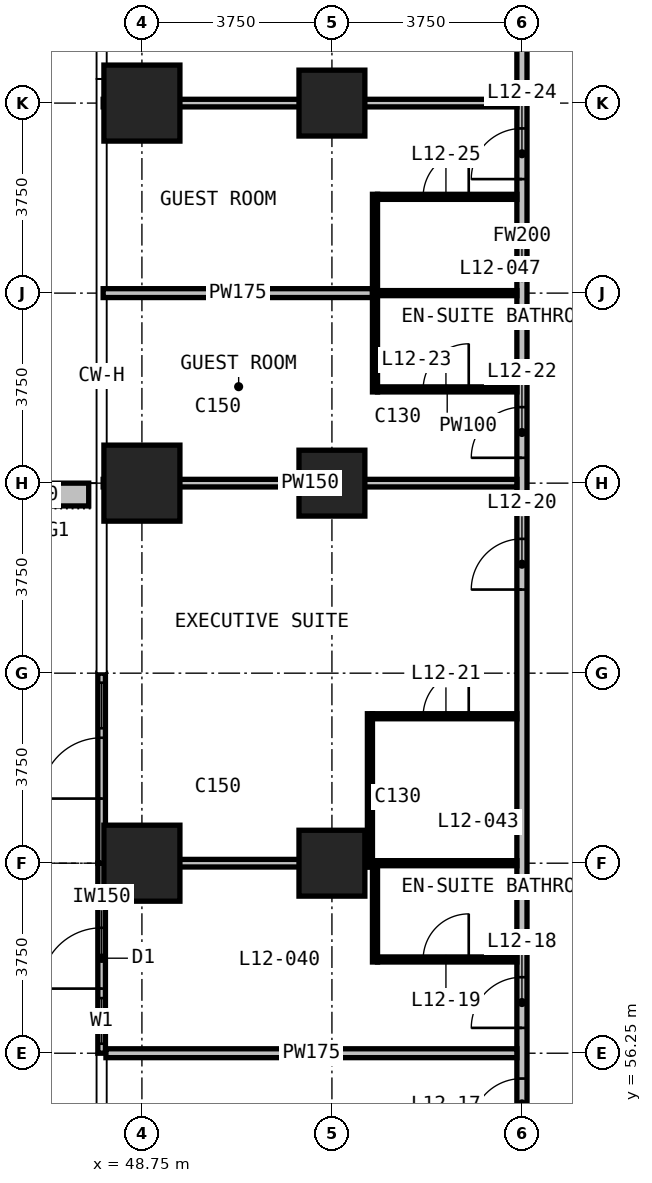
"""IFC4 building model, lengths in metres.
Left out: names, types, materials, properties, quantities, classifications, styles, units other than length and angle.
Written with IfcOpenShell. Run it as: python <this file> out.ifc"""

import sys

from ifc_helpers import new_model, si_unit, direction, frame, frame_2d, origin, origin_2d, place, context, subcontext, project, spatial, rectangle, extrude, element, fill, save


model = new_model("IFC4")
c1 = context("Model", 3, precision=1e-05, world=origin(), true_north=direction((0.0, 1.0)))
c2 = subcontext(c1, "Body", "Model", "MODEL_VIEW")
j1 = project(units=[si_unit("LENGTHUNIT", "METRE"), si_unit("PLANEANGLEUNIT", "RADIAN")], contexts=[c1])
p1 = place(None, origin())
s1 = spatial("IfcSite", under=j1, at=p1, CompositionType="ELEMENT")
p2 = place(p1, origin())
s2 = spatial("IfcBuilding", under=s1, at=p2, CompositionType="ELEMENT")
p3 = place(p2, frame((0.0, 0.0, 59.3)))
s3 = spatial("IfcBuildingStorey", under=s2, at=p3, CompositionType="ELEMENT", Elevation=59.3)
for number, where, z_axis, x_axis in (
    (1, (48.75, 60.0, 0.0), (0.0, 0.0, 1.0), (1.0, 0.0, 0.0)),
    (2, (48.75, 67.5, 0.0), (0.0, 0.0, 1.0), (1.0, 0.0, 0.0)),
    (3, (48.75, 75.0, 0.0), (0.0, 0.0, 1.0), (1.0, 0.0, 0.0)),
):
    element("IfcColumn", number, at=place(p3, frame(where, z_axis=z_axis, x_axis=x_axis)), inside=s3, PredefinedType="COLUMN", context=c2, shape_type="SweptSolid", body=[
        extrude(rectangle(XDim=1.5, YDim=1.5, at=origin_2d()), origin(), (0.0, 0.0, 1.0), 3.3),
    ])
for number, where, z_axis, x_axis in (
    (4, (52.5, 60.0, 0.0), (0.0, 0.0, 1.0), (1.0, 0.0, 0.0)),
    (5, (52.5, 67.5, 0.0), (0.0, 0.0, 1.0), (1.0, 0.0, 0.0)),
    (6, (52.5, 75.0, 0.0), (0.0, 0.0, 1.0), (1.0, 0.0, 0.0)),
):
    element("IfcColumn", number, at=place(p3, frame(where, z_axis=z_axis, x_axis=x_axis)), inside=s3, PredefinedType="COLUMN", context=c2, shape_type="SweptSolid", body=[
        extrude(rectangle(XDim=1.3, YDim=1.3, at=origin_2d()), origin(), (0.0, 0.0, 1.0), 3.3),
    ])
p4 = place(p3, frame((47.955, 56.25, 0.0), z_axis=(0.0, 0.0, 1.0), x_axis=(0.0, 1.0, 0.0)))
e7 = element("IfcWall", 7, at=p4, inside=s3, PredefinedType="SOLIDWALL", context=c2, shape_type="SweptSolid", body=[
    extrude(rectangle(XDim=3.75, YDim=0.15, at=frame_2d((1.875, 0.0))), origin(), (0.0, 0.0, 1.0), 3.0),
])
p5 = place(p4, frame((0.188, 0.0, 0.1)))
e8 = element("IfcOpeningElement", 8, at=p5, cuts=e7, PredefinedType="OPENING", context=c2, shape_type="SweptSolid", body=[
    extrude(rectangle(XDim=0.9, YDim=2.4, at=frame_2d((0.45, 1.2))), frame((0.0, 0.085, 0.0), z_axis=(0.0, -1.0, 0.0), x_axis=(1.0, 0.0, 0.0)), (0.0, 0.0, 1.0), 0.17),
])
p6 = place(p4, frame((1.275, 0.0, 0.0)))
e9 = element("IfcOpeningElement", 9, at=p6, cuts=e7, PredefinedType="OPENING", context=c2, shape_type="SweptSolid", body=[
    extrude(rectangle(XDim=1.2, YDim=2.4, at=frame_2d((0.6, 1.2))), frame((0.0, 0.085, 0.0), z_axis=(0.0, -1.0, 0.0), x_axis=(1.0, 0.0, 0.0)), (0.0, 0.0, 1.0), 0.17),
])
p7 = place(p3, frame((47.955, 60.0, 0.0), z_axis=(0.0, 0.0, 1.0), x_axis=(0.0, 1.0, 0.0)))
e10 = element("IfcWall", 10, at=p7, inside=s3, PredefinedType="SOLIDWALL", context=c2, shape_type="SweptSolid", body=[
    extrude(rectangle(XDim=3.75, YDim=0.15, at=frame_2d((1.875, 0.0))), origin(), (0.0, 0.0, 1.0), 3.0),
])
p8 = place(p7, frame((1.275, 0.0, 0.0)))
e11 = element("IfcOpeningElement", 11, at=p8, cuts=e10, PredefinedType="OPENING", context=c2, shape_type="SweptSolid", body=[
    extrude(rectangle(XDim=1.2, YDim=2.4, at=frame_2d((0.6, 1.2))), frame((0.0, 0.085, 0.0), z_axis=(0.0, -1.0, 0.0), x_axis=(1.0, 0.0, 0.0)), (0.0, 0.0, 1.0), 0.17),
])
p9 = place(p7, frame((2.663, 0.0, 0.1)))
e12 = element("IfcOpeningElement", 12, at=p9, cuts=e10, PredefinedType="OPENING", context=c2, shape_type="SweptSolid", body=[
    extrude(rectangle(XDim=0.9, YDim=2.4, at=frame_2d((0.45, 1.2))), frame((0.0, 0.085, 0.0), z_axis=(0.0, -1.0, 0.0), x_axis=(1.0, 0.0, 0.0)), (0.0, 0.0, 1.0), 0.17),
])
p10 = place(p3, frame((47.7, 67.275, 0.0), z_axis=(0.0, 0.0, 1.0), x_axis=(-1.0, 0.0, 0.0)))
e13 = element("IfcWall", 13, at=p10, inside=s3, PredefinedType="USERDEFINED", context=c2, shape_type="SweptSolid", body=[
    extrude(rectangle(XDim=2.35, YDim=0.45, at=frame_2d((1.175, 0.0))), origin(), (0.0, 0.0, 1.0), 1.1),
])
p11 = place(p3, frame((56.25, 52.4, 0.0), z_axis=(0.0, 0.0, 1.0), x_axis=(0.0, 1.0, 0.0)))
e14 = element("IfcWall", 14, at=p11, inside=s3, PredefinedType="PARTITIONING", context=c2, shape_type="SweptSolid", body=[
    extrude(rectangle(XDim=38.31, YDim=0.2, at=frame_2d((19.155, 0.0))), origin(), (0.0, 0.0, 1.0), 3.0),
])
p12 = place(p11, frame((2.35, 0.0, 0.0)))
e15 = element("IfcOpeningElement", 15, at=p12, cuts=e14, PredefinedType="OPENING", context=c2, shape_type="SweptSolid", body=[
    extrude(rectangle(XDim=1.0, YDim=2.2, at=frame_2d((0.5, 1.1))), frame((0.0, 0.11, 0.0), z_axis=(0.0, -1.0, 0.0), x_axis=(1.0, 0.0, 0.0)), (0.0, 0.0, 1.0), 0.22),
])
p13 = place(p11, frame((4.35, 0.0, 0.0)))
e16 = element("IfcOpeningElement", 16, at=p13, cuts=e14, PredefinedType="OPENING", context=c2, shape_type="SweptSolid", body=[
    extrude(rectangle(XDim=1.0, YDim=2.2, at=frame_2d((0.5, 1.1))), frame((0.0, 0.11, 0.0), z_axis=(0.0, -1.0, 0.0), x_axis=(1.0, 0.0, 0.0)), (0.0, 0.0, 1.0), 0.22),
])
p14 = place(p11, frame((13.0, 0.0, 0.0)))
e17 = element("IfcOpeningElement", 17, at=p14, cuts=e14, PredefinedType="OPENING", context=c2, shape_type="SweptSolid", body=[
    extrude(rectangle(XDim=1.0, YDim=2.2, at=frame_2d((0.5, 1.1))), frame((0.0, 0.11, 0.0), z_axis=(0.0, -1.0, 0.0), x_axis=(1.0, 0.0, 0.0)), (0.0, 0.0, 1.0), 0.22),
])
p15 = place(p11, frame((15.6, 0.0, 0.0)))
e18 = element("IfcOpeningElement", 18, at=p15, cuts=e14, PredefinedType="OPENING", context=c2, shape_type="SweptSolid", body=[
    extrude(rectangle(XDim=1.0, YDim=2.2, at=frame_2d((0.5, 1.1))), frame((0.0, 0.11, 0.0), z_axis=(0.0, -1.0, 0.0), x_axis=(1.0, 0.0, 0.0)), (0.0, 0.0, 1.0), 0.22),
])
p16 = place(p11, frame((21.1, 0.0, 0.0)))
e19 = element("IfcOpeningElement", 19, at=p16, cuts=e14, PredefinedType="OPENING", context=c2, shape_type="SweptSolid", body=[
    extrude(rectangle(XDim=1.0, YDim=2.2, at=frame_2d((0.5, 1.1))), frame((0.0, 0.11, 0.0), z_axis=(0.0, -1.0, 0.0), x_axis=(1.0, 0.0, 0.0)), (0.0, 0.0, 1.0), 0.22),
])
p17 = place(p11, frame((23.7, 0.0, 0.0)))
e20 = element("IfcOpeningElement", 20, at=p17, cuts=e14, PredefinedType="OPENING", context=c2, shape_type="SweptSolid", body=[
    extrude(rectangle(XDim=1.0, YDim=2.2, at=frame_2d((0.5, 1.1))), frame((0.0, 0.11, 0.0), z_axis=(0.0, -1.0, 0.0), x_axis=(1.0, 0.0, 0.0)), (0.0, 0.0, 1.0), 0.22),
])
p18 = place(p11, frame((31.55, 0.0, 0.0)))
e21 = element("IfcOpeningElement", 21, at=p18, cuts=e14, PredefinedType="OPENING", context=c2, shape_type="SweptSolid", body=[
    extrude(rectangle(XDim=0.9, YDim=2.2, at=frame_2d((0.45, 1.1))), frame((0.0, 0.11, 0.0), z_axis=(0.0, -1.0, 0.0), x_axis=(1.0, 0.0, 0.0)), (0.0, 0.0, 1.0), 0.22),
])
p19 = place(p11, frame((35.65, 0.0, 0.0)))
e22 = element("IfcOpeningElement", 22, at=p19, cuts=e14, PredefinedType="OPENING", context=c2, shape_type="SweptSolid", body=[
    extrude(rectangle(XDim=0.9, YDim=2.2, at=frame_2d((0.45, 1.1))), frame((0.0, 0.11, 0.0), z_axis=(0.0, -1.0, 0.0), x_axis=(1.0, 0.0, 0.0)), (0.0, 0.0, 1.0), 0.22),
])
p20 = place(p3, frame((48.04, 56.25, 0.0), z_axis=(0.0, 0.0, 1.0), x_axis=(1.0, 0.0, 0.0)))
e23 = element("IfcWall", 23, at=p20, inside=s3, PredefinedType="PARTITIONING", context=c2, shape_type="SweptSolid", body=[
    extrude(rectangle(XDim=8.11, YDim=0.175, at=frame_2d((4.055, 0.0))), origin(), (0.0, 0.0, 1.0), 3.0),
])
p21 = place(p3, frame((47.985, 71.25, 0.0), z_axis=(0.0, 0.0, 1.0), x_axis=(1.0, 0.0, 0.0)))
e24 = element("IfcWall", 24, at=p21, inside=s3, PredefinedType="PARTITIONING", context=c2, shape_type="SweptSolid", body=[
    extrude(rectangle(XDim=5.315, YDim=0.175, at=frame_2d((2.657, 0.0))), origin(), (0.0, 0.0, 1.0), 3.0),
])
p22 = place(p3, frame((48.04, 60.0, 0.0), z_axis=(0.0, 0.0, 1.0), x_axis=(1.0, 0.0, 0.0)))
e25 = element("IfcWall", 25, at=p22, inside=s3, PredefinedType="PARTITIONING", context=c2, shape_type="SweptSolid", body=[
    extrude(rectangle(XDim=5.16, YDim=0.15, at=frame_2d((2.58, 0.0))), origin(), (0.0, 0.0, 1.0), 3.0),
])
for number, where, z_axis, x_axis in (
    (26, (47.985, 67.5, 0.0), (0.0, 0.0, 1.0), (1.0, 0.0, 0.0)),
    (27, (47.985, 75.0, 0.0), (0.0, 0.0, 1.0), (1.0, 0.0, 0.0)),
):
    element("IfcWall", number, at=place(p3, frame(where, z_axis=z_axis, x_axis=x_axis)), inside=s3, PredefinedType="PARTITIONING", context=c2, shape_type="SweptSolid", body=[
        extrude(rectangle(XDim=8.165, YDim=0.15, at=frame_2d((4.083, 0.0))), origin(), (0.0, 0.0, 1.0), 3.0),
    ])
p23 = place(p3, frame((53.4, 58.1, 0.0), z_axis=(0.0, 0.0, 1.0), x_axis=(1.0, 0.0, 0.0)))
e28 = element("IfcWall", 28, at=p23, inside=s3, PredefinedType="PARTITIONING", context=c2, shape_type="SweptSolid", body=[
    extrude(rectangle(XDim=2.75, YDim=0.1, at=frame_2d((1.375, 0.0))), origin(), (0.0, 0.0, 1.0), 3.0),
])
p24 = place(p23, frame((0.9, 0.0, 0.0)))
e29 = element("IfcOpeningElement", 29, at=p24, cuts=e28, PredefinedType="OPENING", context=c2, shape_type="SweptSolid", body=[
    extrude(rectangle(XDim=0.9, YDim=2.2, at=frame_2d((0.45, 1.1))), frame((0.0, 0.06, 0.0), z_axis=(0.0, -1.0, 0.0), x_axis=(1.0, 0.0, 0.0)), (0.0, 0.0, 1.0), 0.12),
])
p25 = place(p3, frame((53.4, 60.0, 0.0), z_axis=(0.0, 0.0, 1.0), x_axis=(1.0, 0.0, 0.0)))
e30 = element("IfcWall", 30, at=p25, inside=s3, PredefinedType="PARTITIONING", context=c2, shape_type="SweptSolid", body=[
    extrude(rectangle(XDim=2.75, YDim=0.1, at=frame_2d((1.375, 0.0))), origin(), (0.0, 0.0, 1.0), 3.0),
])
p26 = place(p3, frame((53.3, 62.9, 0.0), z_axis=(0.0, 0.0, 1.0), x_axis=(1.0, 0.0, 0.0)))
e31 = element("IfcWall", 31, at=p26, inside=s3, PredefinedType="PARTITIONING", context=c2, shape_type="SweptSolid", body=[
    extrude(rectangle(XDim=2.85, YDim=0.1, at=frame_2d((1.425, 0.0))), origin(), (0.0, 0.0, 1.0), 3.0),
])
p27 = place(p26, frame((1.0, 0.0, 0.0)))
e32 = element("IfcOpeningElement", 32, at=p27, cuts=e31, PredefinedType="OPENING", context=c2, shape_type="SweptSolid", body=[
    extrude(rectangle(XDim=0.9, YDim=2.2, at=frame_2d((0.45, 1.1))), frame((0.0, 0.06, 0.0), z_axis=(0.0, -1.0, 0.0), x_axis=(1.0, 0.0, 0.0)), (0.0, 0.0, 1.0), 0.12),
])
p28 = place(p3, frame((53.4, 69.35, 0.0), z_axis=(0.0, 0.0, 1.0), x_axis=(1.0, 0.0, 0.0)))
e33 = element("IfcWall", 33, at=p28, inside=s3, PredefinedType="PARTITIONING", context=c2, shape_type="SweptSolid", body=[
    extrude(rectangle(XDim=2.75, YDim=0.1, at=frame_2d((1.375, 0.0))), origin(), (0.0, 0.0, 1.0), 3.0),
])
p29 = place(p28, frame((0.9, 0.0, 0.0)))
e34 = element("IfcOpeningElement", 34, at=p29, cuts=e33, PredefinedType="OPENING", context=c2, shape_type="SweptSolid", body=[
    extrude(rectangle(XDim=0.9, YDim=2.2, at=frame_2d((0.45, 1.1))), frame((0.0, 0.06, 0.0), z_axis=(0.0, -1.0, 0.0), x_axis=(1.0, 0.0, 0.0)), (0.0, 0.0, 1.0), 0.12),
])
p30 = place(p3, frame((53.4, 71.25, 0.0), z_axis=(0.0, 0.0, 1.0), x_axis=(1.0, 0.0, 0.0)))
e35 = element("IfcWall", 35, at=p30, inside=s3, PredefinedType="PARTITIONING", context=c2, shape_type="SweptSolid", body=[
    extrude(rectangle(XDim=2.75, YDim=0.1, at=frame_2d((1.375, 0.0))), origin(), (0.0, 0.0, 1.0), 3.0),
])
p31 = place(p3, frame((53.4, 73.15, 0.0), z_axis=(0.0, 0.0, 1.0), x_axis=(1.0, 0.0, 0.0)))
e36 = element("IfcWall", 36, at=p31, inside=s3, PredefinedType="PARTITIONING", context=c2, shape_type="SweptSolid", body=[
    extrude(rectangle(XDim=2.75, YDim=0.1, at=frame_2d((1.375, 0.0))), origin(), (0.0, 0.0, 1.0), 3.0),
])
p32 = place(p31, frame((0.9, 0.0, 0.0)))
e37 = element("IfcOpeningElement", 37, at=p32, cuts=e36, PredefinedType="OPENING", context=c2, shape_type="SweptSolid", body=[
    extrude(rectangle(XDim=0.9, YDim=2.2, at=frame_2d((0.45, 1.1))), frame((0.0, 0.06, 0.0), z_axis=(0.0, -1.0, 0.0), x_axis=(1.0, 0.0, 0.0)), (0.0, 0.0, 1.0), 0.12),
])
p33 = place(p3, frame((53.25, 59.925, 0.0), z_axis=(0.0, 0.0, 1.0), x_axis=(0.0, 1.0, 0.0)))
e38 = element("IfcWall", 38, at=p33, inside=s3, PredefinedType="PARTITIONING", context=c2, shape_type="SweptSolid", body=[
    extrude(rectangle(XDim=3.025, YDim=0.1, at=frame_2d((1.512, 0.0))), origin(), (0.0, 0.0, 1.0), 3.0),
])
p34 = place(p3, frame((53.35, 58.05, 0.0), z_axis=(0.0, 0.0, 1.0), x_axis=(0.0, 1.0, 0.0)))
e39 = element("IfcWall", 39, at=p34, inside=s3, PredefinedType="PARTITIONING", context=c2, shape_type="SweptSolid", body=[
    extrude(rectangle(XDim=2.0, YDim=0.1, at=frame_2d((1.0, 0.0))), origin(), (0.0, 0.0, 1.0), 3.0),
])
p35 = place(p3, frame((53.35, 69.3, 0.0), z_axis=(0.0, 0.0, 1.0), x_axis=(0.0, 1.0, 0.0)))
e40 = element("IfcWall", 40, at=p35, inside=s3, PredefinedType="PARTITIONING", context=c2, shape_type="SweptSolid", body=[
    extrude(rectangle(XDim=3.9, YDim=0.1, at=frame_2d((1.95, 0.0))), origin(), (0.0, 0.0, 1.0), 3.0),
])
p36 = place(p5, origin())
e41 = element("IfcWindow", 41, at=p36, inside=s3, PartitioningType="SINGLE_PANEL", PredefinedType="WINDOW", context=c2, shape_type="SweptSolid", body=[
    extrude(rectangle(XDim=0.9, YDim=2.4, at=frame_2d((0.45, 1.2))), frame((0.0, 0.03, 0.0), z_axis=(0.0, -1.0, 0.0), x_axis=(1.0, 0.0, 0.0)), (0.0, 0.0, 1.0), 0.06),
])
fill(e8, e41)
p37 = place(p6, origin())
e42 = element("IfcDoor", 42, at=p37, inside=s3, OperationType="SINGLE_SWING_LEFT", PredefinedType="DOOR", context=c2, shape_type="SweptSolid", body=[
    extrude(rectangle(XDim=1.2, YDim=2.4, at=frame_2d((0.6, 1.2))), frame((0.0, 0.025, 0.0), z_axis=(0.0, -1.0, 0.0), x_axis=(1.0, 0.0, 0.0)), (0.0, 0.0, 1.0), 0.05),
])
fill(e9, e42)
p38 = place(p8, origin())
e43 = element("IfcDoor", 43, at=p38, inside=s3, OperationType="SINGLE_SWING_LEFT", PredefinedType="DOOR", context=c2, shape_type="SweptSolid", body=[
    extrude(rectangle(XDim=1.2, YDim=2.4, at=frame_2d((0.6, 1.2))), frame((0.0, 0.025, 0.0), z_axis=(0.0, -1.0, 0.0), x_axis=(1.0, 0.0, 0.0)), (0.0, 0.0, 1.0), 0.05),
])
fill(e11, e43)
p39 = place(p9, origin())
e44 = element("IfcWindow", 44, at=p39, inside=s3, PartitioningType="SINGLE_PANEL", PredefinedType="WINDOW", context=c2, shape_type="SweptSolid", body=[
    extrude(rectangle(XDim=0.9, YDim=2.4, at=frame_2d((0.45, 1.2))), frame((0.0, 0.03, 0.0), z_axis=(0.0, -1.0, 0.0), x_axis=(1.0, 0.0, 0.0)), (0.0, 0.0, 1.0), 0.06),
])
fill(e12, e44)
p40 = place(p12, origin())
e45 = element("IfcDoor", 45, at=p40, inside=s3, OperationType="SINGLE_SWING_LEFT", PredefinedType="DOOR", context=c2, shape_type="SweptSolid", body=[
    extrude(rectangle(XDim=1.0, YDim=2.2, at=frame_2d((0.5, 1.1))), frame((0.0, 0.025, 0.0), z_axis=(0.0, -1.0, 0.0), x_axis=(1.0, 0.0, 0.0)), (0.0, 0.0, 1.0), 0.05),
])
fill(e15, e45)
p41 = place(p13, origin())
e46 = element("IfcDoor", 46, at=p41, inside=s3, OperationType="SINGLE_SWING_LEFT", PredefinedType="DOOR", context=c2, shape_type="SweptSolid", body=[
    extrude(rectangle(XDim=1.0, YDim=2.2, at=frame_2d((0.5, 1.1))), frame((0.0, 0.025, 0.0), z_axis=(0.0, -1.0, 0.0), x_axis=(1.0, 0.0, 0.0)), (0.0, 0.0, 1.0), 0.05),
])
fill(e16, e46)
p42 = place(p24, origin())
e47 = element("IfcDoor", 47, at=p42, inside=s3, OperationType="SINGLE_SWING_RIGHT", PredefinedType="DOOR", context=c2, shape_type="SweptSolid", body=[
    extrude(rectangle(XDim=0.9, YDim=2.2, at=frame_2d((0.45, 1.1))), frame((0.0, 0.025, 0.0), z_axis=(0.0, -1.0, 0.0), x_axis=(1.0, 0.0, 0.0)), (0.0, 0.0, 1.0), 0.05),
])
fill(e29, e47)
p43 = place(p14, origin())
e48 = element("IfcDoor", 48, at=p43, inside=s3, OperationType="SINGLE_SWING_RIGHT", PredefinedType="DOOR", context=c2, shape_type="SweptSolid", body=[
    extrude(rectangle(XDim=1.0, YDim=2.2, at=frame_2d((0.5, 1.1))), frame((0.0, 0.025, 0.0), z_axis=(0.0, -1.0, 0.0), x_axis=(1.0, 0.0, 0.0)), (0.0, 0.0, 1.0), 0.05),
])
fill(e17, e48)
p44 = place(p27, origin())
e49 = element("IfcDoor", 49, at=p44, inside=s3, OperationType="SINGLE_SWING_RIGHT", PredefinedType="DOOR", context=c2, shape_type="SweptSolid", body=[
    extrude(rectangle(XDim=0.9, YDim=2.2, at=frame_2d((0.45, 1.1))), frame((0.0, 0.025, 0.0), z_axis=(0.0, -1.0, 0.0), x_axis=(1.0, 0.0, 0.0)), (0.0, 0.0, 1.0), 0.05),
])
fill(e32, e49)
p45 = place(p15, origin())
e50 = element("IfcDoor", 50, at=p45, inside=s3, OperationType="SINGLE_SWING_LEFT", PredefinedType="DOOR", context=c2, shape_type="SweptSolid", body=[
    extrude(rectangle(XDim=1.0, YDim=2.2, at=frame_2d((0.5, 1.1))), frame((0.0, 0.025, 0.0), z_axis=(0.0, -1.0, 0.0), x_axis=(1.0, 0.0, 0.0)), (0.0, 0.0, 1.0), 0.05),
])
fill(e18, e50)
p46 = place(p29, origin())
e51 = element("IfcDoor", 51, at=p46, inside=s3, OperationType="SINGLE_SWING_RIGHT", PredefinedType="DOOR", context=c2, shape_type="SweptSolid", body=[
    extrude(rectangle(XDim=0.9, YDim=2.2, at=frame_2d((0.45, 1.1))), frame((0.0, 0.025, 0.0), z_axis=(0.0, -1.0, 0.0), x_axis=(1.0, 0.0, 0.0)), (0.0, 0.0, 1.0), 0.05),
])
fill(e34, e51)
p47 = place(p16, origin())
e52 = element("IfcDoor", 52, at=p47, inside=s3, OperationType="SINGLE_SWING_LEFT", PredefinedType="DOOR", context=c2, shape_type="SweptSolid", body=[
    extrude(rectangle(XDim=1.0, YDim=2.2, at=frame_2d((0.5, 1.1))), frame((0.0, 0.025, 0.0), z_axis=(0.0, -1.0, 0.0), x_axis=(1.0, 0.0, 0.0)), (0.0, 0.0, 1.0), 0.05),
])
fill(e19, e52)
p48 = place(p32, origin())
e53 = element("IfcDoor", 53, at=p48, inside=s3, OperationType="SINGLE_SWING_RIGHT", PredefinedType="DOOR", context=c2, shape_type="SweptSolid", body=[
    extrude(rectangle(XDim=0.9, YDim=2.2, at=frame_2d((0.45, 1.1))), frame((0.0, 0.025, 0.0), z_axis=(0.0, -1.0, 0.0), x_axis=(1.0, 0.0, 0.0)), (0.0, 0.0, 1.0), 0.05),
])
fill(e37, e53)
save(model, sys.argv[1])
